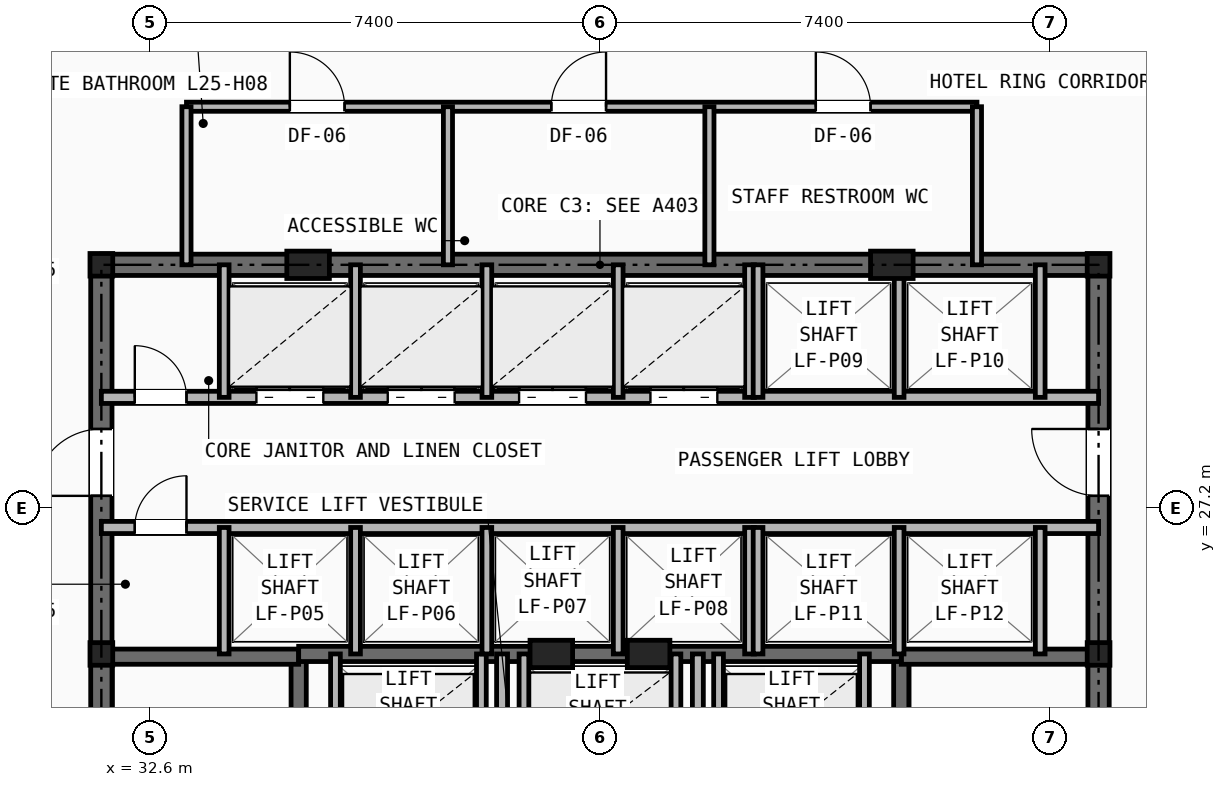
"""IFC4 building model, lengths in metres.
Left out: names, types, materials, properties, quantities, classifications, styles, units other than length and angle.
Written with IfcOpenShell. Run it as: python <this file> out.ifc"""

import sys

from ifc_helpers import new_model, si_unit, direction, frame, frame_2d, origin, origin_2d, place, context, subcontext, project, spatial, rectangle, i_section, extrude, element, fill, save


model = new_model("IFC4")
c1 = context("Model", 3, precision=1e-05, world=origin(), true_north=direction((0.0, 1.0)))
c2 = subcontext(c1, "Body", "Model", "MODEL_VIEW")
j1 = project(units=[si_unit("LENGTHUNIT", "METRE"), si_unit("PLANEANGLEUNIT", "RADIAN")], contexts=[c1])
p1 = place(None, origin())
s1 = spatial("IfcSite", under=j1, at=p1, CompositionType="ELEMENT")
p2 = place(p1, origin())
s2 = spatial("IfcBuilding", under=s1, at=p2, CompositionType="ELEMENT")
p3 = place(p2, frame((0.0, 0.0, 89.4)))
s3 = spatial("IfcBuildingStorey", under=s2, at=p3, CompositionType="ELEMENT", Elevation=89.4)
for number, where, z_axis, x_axis in (
    (1, (31.8, 24.8, 0.0), (0.0, 0.0, 1.0), (1.0, 0.0, 0.0)),
    (2, (48.2, 24.8, 0.0), (0.0, 0.0, 1.0), (1.0, 0.0, 0.0)),
    (3, (31.8, 31.2, 0.0), (0.0, 0.0, 1.0), (1.0, 0.0, 0.0)),
    (4, (48.2, 31.2, 0.0), (0.0, 0.0, 1.0), (1.0, 0.0, 0.0)),
):
    element("IfcColumn", number, at=place(p3, frame(where, z_axis=z_axis, x_axis=x_axis)), inside=s3, PredefinedType="COLUMN", context=c2, shape_type="SweptSolid", body=[
        extrude(i_section(OverallWidth=0.374, OverallDepth=0.372, WebThickness=0.016, FlangeThickness=0.026, at=origin_2d()), origin(), (0.0, 0.0, 1.0), 3.2),
    ])
for number, where, z_axis, x_axis in (
    (5, (35.2, 31.2, 0.0), (0.0, 0.0, 1.0), (1.0, 0.0, 0.0)),
    (6, (44.8, 31.2, 0.0), (0.0, 0.0, 1.0), (1.0, 0.0, 0.0)),
    (7, (39.2, 24.8, 0.0), (0.0, 0.0, 1.0), (1.0, 0.0, 0.0)),
    (8, (40.8, 24.8, 0.0), (0.0, 0.0, 1.0), (1.0, 0.0, 0.0)),
):
    element("IfcColumn", number, at=place(p3, frame(where, z_axis=z_axis, x_axis=x_axis)), inside=s3, PredefinedType="PILASTER", context=c2, shape_type="SweptSolid", body=[
        extrude(rectangle(XDim=0.7, YDim=0.45, at=origin_2d()), origin(), (0.0, 0.0, 1.0), 3.2),
    ])
p4 = place(p3, frame((31.8, 31.2, 0.0), z_axis=(0.0, 0.0, 1.0), x_axis=(1.0, 0.0, 0.0)))
e9 = element("IfcWall", 9, at=p4, inside=s3, PredefinedType="SHEAR", context=c2, shape_type="SweptSolid", body=[
    extrude(rectangle(XDim=16.4, YDim=0.35, at=frame_2d((8.2, 0.0))), origin(), (0.0, 0.0, 1.0), 2.97),
])
p5 = place(p3, frame((31.8, 16.4, 0.0), z_axis=(0.0, 0.0, 1.0), x_axis=(0.0, 1.0, 0.0)))
e10 = element("IfcWall", 10, at=p5, inside=s3, PredefinedType="SHEAR", context=c2, shape_type="SweptSolid", body=[
    extrude(rectangle(XDim=14.8, YDim=0.35, at=frame_2d((7.4, 0.0))), origin(), (0.0, 0.0, 1.0), 2.97),
])
p6 = place(p5, frame((11.0, 0.0, 0.0)))
e11 = element("IfcOpeningElement", 11, at=p6, cuts=e10, PredefinedType="OPENING", context=c2, shape_type="SweptSolid", body=[
    extrude(rectangle(XDim=1.1, YDim=2.15, at=frame_2d((0.55, 1.075))), frame((0.0, 0.185, 0.0), z_axis=(0.0, -1.0, 0.0), x_axis=(1.0, 0.0, 0.0)), (0.0, 0.0, 1.0), 0.37),
])
p7 = place(p3, frame((48.2, 16.4, 0.0), z_axis=(0.0, 0.0, 1.0), x_axis=(0.0, 1.0, 0.0)))
e12 = element("IfcWall", 12, at=p7, inside=s3, PredefinedType="SHEAR", context=c2, shape_type="SweptSolid", body=[
    extrude(rectangle(XDim=14.8, YDim=0.35, at=frame_2d((7.4, 0.0))), origin(), (0.0, 0.0, 1.0), 2.97),
])
p8 = place(p7, frame((11.0, 0.0, 0.0)))
e13 = element("IfcOpeningElement", 13, at=p8, cuts=e12, PredefinedType="OPENING", context=c2, shape_type="SweptSolid", body=[
    extrude(rectangle(XDim=1.1, YDim=2.15, at=frame_2d((0.55, 1.075))), frame((0.0, 0.185, 0.0), z_axis=(0.0, -1.0, 0.0), x_axis=(1.0, 0.0, 0.0)), (0.0, 0.0, 1.0), 0.37),
])
p9 = place(p3, frame((35.045, 16.4, 0.0), z_axis=(0.0, 0.0, 1.0), x_axis=(0.0, 1.0, 0.0)))
e14 = element("IfcWall", 14, at=p9, inside=s3, PredefinedType="SHEAR", context=c2, shape_type="SweptSolid", body=[
    extrude(rectangle(XDim=8.4, YDim=0.25, at=frame_2d((4.2, 0.0))), origin(), (0.0, 0.0, 1.0), 2.97),
])
p10 = place(p9, frame((0.45, 0.0, 0.0)))
e15 = element("IfcOpeningElement", 15, at=p10, cuts=e14, PredefinedType="OPENING", context=c2, shape_type="SweptSolid", body=[
    extrude(rectangle(XDim=0.95, YDim=2.1, at=frame_2d((0.475, 1.05))), frame((0.0, 0.135, 0.0), z_axis=(0.0, -1.0, 0.0), x_axis=(1.0, 0.0, 0.0)), (0.0, 0.0, 1.0), 0.27),
])
p11 = place(p3, frame((31.8, 24.755, 0.0), z_axis=(0.0, 0.0, 1.0), x_axis=(1.0, 0.0, 0.0)))
e16 = element("IfcWall", 16, at=p11, inside=s3, PredefinedType="SHEAR", context=c2, shape_type="SweptSolid", body=[
    extrude(rectangle(XDim=3.245, YDim=0.25, at=frame_2d((1.623, 0.0))), origin(), (0.0, 0.0, 1.0), 2.97),
])
p12 = place(p3, frame((44.955, 16.4, 0.0), z_axis=(0.0, 0.0, 1.0), x_axis=(0.0, 1.0, 0.0)))
e17 = element("IfcWall", 17, at=p12, inside=s3, PredefinedType="SHEAR", context=c2, shape_type="SweptSolid", body=[
    extrude(rectangle(XDim=8.4, YDim=0.25, at=frame_2d((4.2, 0.0))), origin(), (0.0, 0.0, 1.0), 2.97),
])
p13 = place(p12, frame((0.45, 0.0, 0.0)))
e18 = element("IfcOpeningElement", 18, at=p13, cuts=e17, PredefinedType="OPENING", context=c2, shape_type="SweptSolid", body=[
    extrude(rectangle(XDim=0.95, YDim=2.1, at=frame_2d((0.475, 1.05))), frame((0.0, 0.135, 0.0), z_axis=(0.0, -1.0, 0.0), x_axis=(1.0, 0.0, 0.0)), (0.0, 0.0, 1.0), 0.27),
])
p14 = place(p3, frame((44.955, 24.755, 0.0), z_axis=(0.0, 0.0, 1.0), x_axis=(1.0, 0.0, 0.0)))
e19 = element("IfcWall", 19, at=p14, inside=s3, PredefinedType="SHEAR", context=c2, shape_type="SweptSolid", body=[
    extrude(rectangle(XDim=3.245, YDim=0.25, at=frame_2d((1.623, 0.0))), origin(), (0.0, 0.0, 1.0), 2.97),
])
p15 = place(p3, frame((35.045, 24.8, 0.0), z_axis=(0.0, 0.0, 1.0), x_axis=(1.0, 0.0, 0.0)))
e20 = element("IfcWall", 20, at=p15, inside=s3, PredefinedType="SHEAR", context=c2, shape_type="SweptSolid", body=[
    extrude(rectangle(XDim=9.91, YDim=0.25, at=frame_2d((4.955, 0.0))), origin(), (0.0, 0.0, 1.0), 2.97),
])
p16 = place(p3, frame((38.39, 16.4, 0.0), z_axis=(0.0, 0.0, 1.0), x_axis=(0.0, 1.0, 0.0)))
e21 = element("IfcWall", 21, at=p16, inside=s3, PredefinedType="PARTITIONING", context=c2, shape_type="SweptSolid", body=[
    extrude(rectangle(XDim=8.4, YDim=0.18, at=frame_2d((4.2, 0.0))), origin(), (0.0, 0.0, 1.0), 2.698),
])
p17 = place(p16, frame((4.45, 0.0, 0.0)))
e22 = element("IfcOpeningElement", 22, at=p17, cuts=e21, PredefinedType="OPENING", context=c2, shape_type="SweptSolid", body=[
    extrude(rectangle(XDim=0.95, YDim=2.1, at=frame_2d((0.475, 1.05))), frame((0.0, 0.1, 0.0), z_axis=(0.0, -1.0, 0.0), x_axis=(1.0, 0.0, 0.0)), (0.0, 0.0, 1.0), 0.2),
])
p18 = place(p3, frame((41.61, 16.4, 0.0), z_axis=(0.0, 0.0, 1.0), x_axis=(0.0, 1.0, 0.0)))
e23 = element("IfcWall", 23, at=p18, inside=s3, PredefinedType="PARTITIONING", context=c2, shape_type="SweptSolid", body=[
    extrude(rectangle(XDim=8.4, YDim=0.18, at=frame_2d((4.2, 0.0))), origin(), (0.0, 0.0, 1.0), 2.698),
])
p19 = place(p18, frame((2.5, 0.0, 0.0)))
e24 = element("IfcOpeningElement", 24, at=p19, cuts=e23, PredefinedType="OPENING", context=c2, shape_type="SweptSolid", body=[
    extrude(rectangle(XDim=0.85, YDim=2.05, at=frame_2d((0.425, 1.025))), frame((0.0, 0.1, 0.0), z_axis=(0.0, -1.0, 0.0), x_axis=(1.0, 0.0, 0.0)), (0.0, 0.0, 1.0), 0.2),
])
for number, where, z_axis, x_axis in (
    (25, (35.65, 22.48, 0.0), (0.0, 0.0, 1.0), (0.0, 1.0, 0.0)),
    (26, (38.05, 22.48, 0.0), (0.0, 0.0, 1.0), (0.0, 1.0, 0.0)),
    (27, (41.95, 22.48, 0.0), (0.0, 0.0, 1.0), (0.0, 1.0, 0.0)),
    (28, (44.35, 22.48, 0.0), (0.0, 0.0, 1.0), (0.0, 1.0, 0.0)),
    (29, (38.75, 22.48, 0.0), (0.0, 0.0, 1.0), (0.0, 1.0, 0.0)),
    (30, (41.25, 22.48, 0.0), (0.0, 0.0, 1.0), (0.0, 1.0, 0.0)),
):
    element("IfcWall", number, at=place(p3, frame(where, z_axis=z_axis, x_axis=x_axis)), inside=s3, PredefinedType="SOLIDWALL", context=c2, shape_type="SweptSolid", body=[
        extrude(rectangle(XDim=2.32, YDim=0.16, at=frame_2d((1.16, 0.0))), origin(), (0.0, 0.0, 1.0), 2.97),
    ])
p20 = place(p3, frame((31.8, 29.02, 0.0), z_axis=(0.0, 0.0, 1.0), x_axis=(1.0, 0.0, 0.0)))
e31 = element("IfcWall", 31, at=p20, inside=s3, PredefinedType="SOLIDWALL", context=c2, shape_type="SweptSolid", body=[
    extrude(rectangle(XDim=16.4, YDim=0.2, at=frame_2d((8.2, 0.0))), origin(), (0.0, 0.0, 1.0), 2.421),
])
p21 = place(p20, frame((0.55, 0.0, 0.0)))
e32 = element("IfcOpeningElement", 32, at=p21, cuts=e31, PredefinedType="OPENING", context=c2, shape_type="SweptSolid", body=[
    extrude(rectangle(XDim=0.85, YDim=2.05, at=frame_2d((0.425, 1.025))), frame((0.0, 0.11, 0.0), z_axis=(0.0, -1.0, 0.0), x_axis=(1.0, 0.0, 0.0)), (0.0, 0.0, 1.0), 0.22),
])
p22 = place(p20, frame((2.55, 0.0, 0.0)))
e33 = element("IfcOpeningElement", 33, at=p22, cuts=e31, PredefinedType="OPENING", context=c2, shape_type="SweptSolid", body=[
    extrude(rectangle(XDim=1.1, YDim=2.15, at=frame_2d((0.55, 1.075))), frame((0.0, 0.11, 0.0), z_axis=(0.0, -1.0, 0.0), x_axis=(1.0, 0.0, 0.0)), (0.0, 0.0, 1.0), 0.22),
])
p23 = place(p20, frame((4.71, 0.0, 0.0)))
e34 = element("IfcOpeningElement", 34, at=p23, cuts=e31, PredefinedType="OPENING", context=c2, shape_type="SweptSolid", body=[
    extrude(rectangle(XDim=1.1, YDim=2.15, at=frame_2d((0.55, 1.075))), frame((0.0, 0.11, 0.0), z_axis=(0.0, -1.0, 0.0), x_axis=(1.0, 0.0, 0.0)), (0.0, 0.0, 1.0), 0.22),
])
p24 = place(p20, frame((6.87, 0.0, 0.0)))
e35 = element("IfcOpeningElement", 35, at=p24, cuts=e31, PredefinedType="OPENING", context=c2, shape_type="SweptSolid", body=[
    extrude(rectangle(XDim=1.1, YDim=2.15, at=frame_2d((0.55, 1.075))), frame((0.0, 0.11, 0.0), z_axis=(0.0, -1.0, 0.0), x_axis=(1.0, 0.0, 0.0)), (0.0, 0.0, 1.0), 0.22),
])
p25 = place(p20, frame((9.03, 0.0, 0.0)))
e36 = element("IfcOpeningElement", 36, at=p25, cuts=e31, PredefinedType="OPENING", context=c2, shape_type="SweptSolid", body=[
    extrude(rectangle(XDim=1.1, YDim=2.15, at=frame_2d((0.55, 1.075))), frame((0.0, 0.11, 0.0), z_axis=(0.0, -1.0, 0.0), x_axis=(1.0, 0.0, 0.0)), (0.0, 0.0, 1.0), 0.22),
])
p26 = place(p3, frame((31.8, 26.88, 0.0), z_axis=(0.0, 0.0, 1.0), x_axis=(1.0, 0.0, 0.0)))
e37 = element("IfcWall", 37, at=p26, inside=s3, PredefinedType="SOLIDWALL", context=c2, shape_type="SweptSolid", body=[
    extrude(rectangle(XDim=16.4, YDim=0.2, at=frame_2d((8.2, 0.0))), origin(), (0.0, 0.0, 1.0), 2.421),
])
p27 = place(p26, frame((0.55, 0.0, 0.0)))
e38 = element("IfcOpeningElement", 38, at=p27, cuts=e37, PredefinedType="OPENING", context=c2, shape_type="SweptSolid", body=[
    extrude(rectangle(XDim=0.85, YDim=2.05, at=frame_2d((0.425, 1.025))), frame((0.0, 0.11, 0.0), z_axis=(0.0, -1.0, 0.0), x_axis=(1.0, 0.0, 0.0)), (0.0, 0.0, 1.0), 0.22),
])
p28 = place(p3, frame((33.82, 29.02, 0.0), z_axis=(0.0, 0.0, 1.0), x_axis=(0.0, 1.0, 0.0)))
e39 = element("IfcWall", 39, at=p28, inside=s3, PredefinedType="SOLIDWALL", context=c2, shape_type="SweptSolid", body=[
    extrude(rectangle(XDim=2.18, YDim=0.16, at=frame_2d((1.09, 0.0))), origin(), (0.0, 0.0, 1.0), 2.698),
])
p29 = place(p3, frame((33.82, 24.8, 0.0), z_axis=(0.0, 0.0, 1.0), x_axis=(0.0, 1.0, 0.0)))
e40 = element("IfcWall", 40, at=p29, inside=s3, PredefinedType="SOLIDWALL", context=c2, shape_type="SweptSolid", body=[
    extrude(rectangle(XDim=2.08, YDim=0.16, at=frame_2d((1.04, 0.0))), origin(), (0.0, 0.0, 1.0), 2.97),
])
for number, where, z_axis, x_axis in (
    (41, (35.98, 29.02, 0.0), (0.0, 0.0, 1.0), (0.0, 1.0, 0.0)),
    (42, (38.14, 29.02, 0.0), (0.0, 0.0, 1.0), (0.0, 1.0, 0.0)),
    (43, (40.3, 29.02, 0.0), (0.0, 0.0, 1.0), (0.0, 1.0, 0.0)),
    (44, (42.46, 29.02, 0.0), (0.0, 0.0, 1.0), (0.0, 1.0, 0.0)),
):
    element("IfcWall", number, at=place(p3, frame(where, z_axis=z_axis, x_axis=x_axis)), inside=s3, PredefinedType="SOLIDWALL", context=c2, shape_type="SweptSolid", body=[
        extrude(rectangle(XDim=2.18, YDim=0.16, at=frame_2d((1.09, 0.0))), origin(), (0.0, 0.0, 1.0), 2.698),
    ])
for number, where, z_axis, x_axis in (
    (45, (35.98, 24.8, 0.0), (0.0, 0.0, 1.0), (0.0, 1.0, 0.0)),
    (46, (38.14, 24.8, 0.0), (0.0, 0.0, 1.0), (0.0, 1.0, 0.0)),
    (47, (40.3, 24.8, 0.0), (0.0, 0.0, 1.0), (0.0, 1.0, 0.0)),
    (48, (42.46, 24.8, 0.0), (0.0, 0.0, 1.0), (0.0, 1.0, 0.0)),
):
    element("IfcWall", number, at=place(p3, frame(where, z_axis=z_axis, x_axis=x_axis)), inside=s3, PredefinedType="SOLIDWALL", context=c2, shape_type="SweptSolid", body=[
        extrude(rectangle(XDim=2.08, YDim=0.16, at=frame_2d((1.04, 0.0))), origin(), (0.0, 0.0, 1.0), 2.97),
    ])
for number, where, z_axis, x_axis in (
    (49, (42.6, 29.02, 0.0), (0.0, 0.0, 1.0), (0.0, 1.0, 0.0)),
    (50, (44.92, 29.02, 0.0), (0.0, 0.0, 1.0), (0.0, 1.0, 0.0)),
    (51, (47.24, 29.02, 0.0), (0.0, 0.0, 1.0), (0.0, 1.0, 0.0)),
):
    element("IfcWall", number, at=place(p3, frame(where, z_axis=z_axis, x_axis=x_axis)), inside=s3, PredefinedType="SOLIDWALL", context=c2, shape_type="SweptSolid", body=[
        extrude(rectangle(XDim=2.18, YDim=0.16, at=frame_2d((1.09, 0.0))), origin(), (0.0, 0.0, 1.0), 2.698),
    ])
for number, where, z_axis, x_axis in (
    (52, (42.6, 24.8, 0.0), (0.0, 0.0, 1.0), (0.0, 1.0, 0.0)),
    (53, (44.92, 24.8, 0.0), (0.0, 0.0, 1.0), (0.0, 1.0, 0.0)),
    (54, (47.24, 24.8, 0.0), (0.0, 0.0, 1.0), (0.0, 1.0, 0.0)),
):
    element("IfcWall", number, at=place(p3, frame(where, z_axis=z_axis, x_axis=x_axis)), inside=s3, PredefinedType="SOLIDWALL", context=c2, shape_type="SweptSolid", body=[
        extrude(rectangle(XDim=2.08, YDim=0.16, at=frame_2d((1.04, 0.0))), origin(), (0.0, 0.0, 1.0), 2.97),
    ])
p30 = place(p3, frame((33.2, 33.8, 0.0), z_axis=(0.0, 0.0, 1.0), x_axis=(1.0, 0.0, 0.0)))
e55 = element("IfcWall", 55, at=p30, inside=s3, PredefinedType="PARTITIONING", context=c2, shape_type="SweptSolid", body=[
    extrude(rectangle(XDim=13.0, YDim=0.15, at=frame_2d((6.5, 0.0))), origin(), (0.0, 0.0, 1.0), 2.97),
])
p31 = place(p30, frame((1.7, 0.0, 0.0)))
e56 = element("IfcOpeningElement", 56, at=p31, cuts=e55, PredefinedType="OPENING", context=c2, shape_type="SweptSolid", body=[
    extrude(rectangle(XDim=0.9, YDim=2.1, at=frame_2d((0.45, 1.05))), frame((0.0, 0.085, 0.0), z_axis=(0.0, -1.0, 0.0), x_axis=(1.0, 0.0, 0.0)), (0.0, 0.0, 1.0), 0.17),
])
p32 = place(p30, frame((6.0, 0.0, 0.0)))
e57 = element("IfcOpeningElement", 57, at=p32, cuts=e55, PredefinedType="OPENING", context=c2, shape_type="SweptSolid", body=[
    extrude(rectangle(XDim=0.9, YDim=2.1, at=frame_2d((0.45, 1.05))), frame((0.0, 0.085, 0.0), z_axis=(0.0, -1.0, 0.0), x_axis=(1.0, 0.0, 0.0)), (0.0, 0.0, 1.0), 0.17),
])
p33 = place(p30, frame((10.35, 0.0, 0.0)))
e58 = element("IfcOpeningElement", 58, at=p33, cuts=e55, PredefinedType="OPENING", context=c2, shape_type="SweptSolid", body=[
    extrude(rectangle(XDim=0.9, YDim=2.1, at=frame_2d((0.45, 1.05))), frame((0.0, 0.085, 0.0), z_axis=(0.0, -1.0, 0.0), x_axis=(1.0, 0.0, 0.0)), (0.0, 0.0, 1.0), 0.17),
])
for number, where, z_axis, x_axis in (
    (59, (33.2, 31.2, 0.0), (0.0, 0.0, 1.0), (0.0, 1.0, 0.0)),
    (60, (46.2, 31.2, 0.0), (0.0, 0.0, 1.0), (0.0, 1.0, 0.0)),
    (61, (37.5, 31.2, 0.0), (0.0, 0.0, 1.0), (0.0, 1.0, 0.0)),
    (62, (41.8, 31.2, 0.0), (0.0, 0.0, 1.0), (0.0, 1.0, 0.0)),
):
    element("IfcWall", number, at=place(p3, frame(where, z_axis=z_axis, x_axis=x_axis)), inside=s3, PredefinedType="PARTITIONING", context=c2, shape_type="SweptSolid", body=[
        extrude(rectangle(XDim=2.6, YDim=0.15, at=frame_2d((1.3, 0.0))), origin(), (0.0, 0.0, 1.0), 2.698),
    ])
p34 = place(p21, origin())
e63 = element("IfcDoor", 63, at=p34, inside=s3, OperationType="SINGLE_SWING_LEFT", PredefinedType="DOOR", context=c2, shape_type="SweptSolid", body=[
    extrude(rectangle(XDim=0.85, YDim=2.05, at=frame_2d((0.425, 1.025))), frame((0.0, 0.025, 0.0), z_axis=(0.0, -1.0, 0.0), x_axis=(1.0, 0.0, 0.0)), (0.0, 0.0, 1.0), 0.05),
])
fill(e32, e63)
p35 = place(p27, origin())
e64 = element("IfcDoor", 64, at=p35, inside=s3, OperationType="SINGLE_SWING_RIGHT", PredefinedType="DOOR", context=c2, shape_type="SweptSolid", body=[
    extrude(rectangle(XDim=0.85, YDim=2.05, at=frame_2d((0.425, 1.025))), frame((0.0, 0.025, 0.0), z_axis=(0.0, -1.0, 0.0), x_axis=(1.0, 0.0, 0.0)), (0.0, 0.0, 1.0), 0.05),
])
fill(e38, e64)
p36 = place(p6, origin())
e65 = element("IfcDoor", 65, at=p36, inside=s3, OperationType="SINGLE_SWING_LEFT", PredefinedType="DOOR", context=c2, shape_type="SweptSolid", body=[
    extrude(rectangle(XDim=1.1, YDim=2.15, at=frame_2d((0.55, 1.075))), frame((0.0, 0.025, 0.0), z_axis=(0.0, -1.0, 0.0), x_axis=(1.0, 0.0, 0.0)), (0.0, 0.0, 1.0), 0.05),
])
fill(e11, e65)
p37 = place(p8, origin())
e66 = element("IfcDoor", 66, at=p37, inside=s3, OperationType="SINGLE_SWING_RIGHT", PredefinedType="DOOR", context=c2, shape_type="SweptSolid", body=[
    extrude(rectangle(XDim=1.1, YDim=2.15, at=frame_2d((0.55, 1.075))), frame((0.0, 0.025, 0.0), z_axis=(0.0, -1.0, 0.0), x_axis=(1.0, 0.0, 0.0)), (0.0, 0.0, 1.0), 0.05),
])
fill(e13, e66)
p38 = place(p22, origin())
e67 = element("IfcDoor", 67, at=p38, inside=s3, OperationType="DOUBLE_DOOR_SLIDING", PredefinedType="DOOR", context=c2, shape_type="SweptSolid", body=[
    extrude(rectangle(XDim=1.1, YDim=2.15, at=frame_2d((0.55, 1.075))), frame((0.0, 0.025, 0.0), z_axis=(0.0, -1.0, 0.0), x_axis=(1.0, 0.0, 0.0)), (0.0, 0.0, 1.0), 0.05),
])
fill(e33, e67)
p39 = place(p23, origin())
e68 = element("IfcDoor", 68, at=p39, inside=s3, OperationType="DOUBLE_DOOR_SLIDING", PredefinedType="DOOR", context=c2, shape_type="SweptSolid", body=[
    extrude(rectangle(XDim=1.1, YDim=2.15, at=frame_2d((0.55, 1.075))), frame((0.0, 0.025, 0.0), z_axis=(0.0, -1.0, 0.0), x_axis=(1.0, 0.0, 0.0)), (0.0, 0.0, 1.0), 0.05),
])
fill(e34, e68)
p40 = place(p24, origin())
e69 = element("IfcDoor", 69, at=p40, inside=s3, OperationType="DOUBLE_DOOR_SLIDING", PredefinedType="DOOR", context=c2, shape_type="SweptSolid", body=[
    extrude(rectangle(XDim=1.1, YDim=2.15, at=frame_2d((0.55, 1.075))), frame((0.0, 0.025, 0.0), z_axis=(0.0, -1.0, 0.0), x_axis=(1.0, 0.0, 0.0)), (0.0, 0.0, 1.0), 0.05),
])
fill(e35, e69)
p41 = place(p25, origin())
e70 = element("IfcDoor", 70, at=p41, inside=s3, OperationType="DOUBLE_DOOR_SLIDING", PredefinedType="DOOR", context=c2, shape_type="SweptSolid", body=[
    extrude(rectangle(XDim=1.1, YDim=2.15, at=frame_2d((0.55, 1.075))), frame((0.0, 0.025, 0.0), z_axis=(0.0, -1.0, 0.0), x_axis=(1.0, 0.0, 0.0)), (0.0, 0.0, 1.0), 0.05),
])
fill(e36, e70)
p42 = place(p31, origin())
e71 = element("IfcDoor", 71, at=p42, inside=s3, OperationType="SINGLE_SWING_LEFT", PredefinedType="DOOR", context=c2, shape_type="SweptSolid", body=[
    extrude(rectangle(XDim=0.9, YDim=2.1, at=frame_2d((0.45, 1.05))), frame((0.0, 0.025, 0.0), z_axis=(0.0, -1.0, 0.0), x_axis=(1.0, 0.0, 0.0)), (0.0, 0.0, 1.0), 0.05),
])
fill(e56, e71)
p43 = place(p32, origin())
e72 = element("IfcDoor", 72, at=p43, inside=s3, OperationType="SINGLE_SWING_RIGHT", PredefinedType="DOOR", context=c2, shape_type="SweptSolid", body=[
    extrude(rectangle(XDim=0.9, YDim=2.1, at=frame_2d((0.45, 1.05))), frame((0.0, 0.025, 0.0), z_axis=(0.0, -1.0, 0.0), x_axis=(1.0, 0.0, 0.0)), (0.0, 0.0, 1.0), 0.05),
])
fill(e57, e72)
p44 = place(p33, origin())
e73 = element("IfcDoor", 73, at=p44, inside=s3, OperationType="SINGLE_SWING_LEFT", PredefinedType="DOOR", context=c2, shape_type="SweptSolid", body=[
    extrude(rectangle(XDim=0.9, YDim=2.1, at=frame_2d((0.45, 1.05))), frame((0.0, 0.025, 0.0), z_axis=(0.0, -1.0, 0.0), x_axis=(1.0, 0.0, 0.0)), (0.0, 0.0, 1.0), 0.05),
])
fill(e58, e73)
save(model, sys.argv[1])
